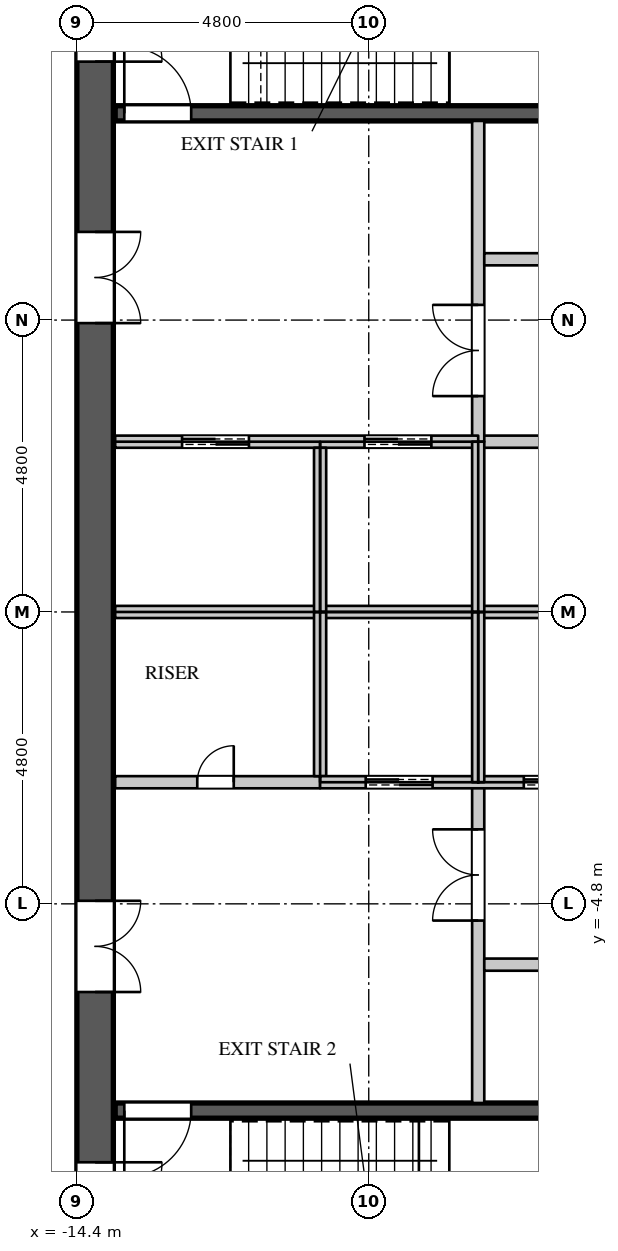
"""IFC4 building model, lengths in metres.
Left out: names, types, materials, properties, quantities, classifications, styles, units other than length and angle.
Written with IfcOpenShell. Run it as: python <this file> out.ifc"""

import sys

from ifc_helpers import new_model, si_unit, direction, frame, frame_2d, origin, place, context, subcontext, project, spatial, rectangle, extrude, element, fill, save


model = new_model("IFC4")
c1 = context("Model", 3, precision=1e-05, world=origin(), true_north=direction((0.0, 1.0)))
c2 = subcontext(c1, "Body", "Model", "MODEL_VIEW")
j1 = project(units=[si_unit("LENGTHUNIT", "METRE"), si_unit("PLANEANGLEUNIT", "RADIAN")], contexts=[c1])
p1 = place(None, origin())
s1 = spatial("IfcSite", under=j1, at=p1, CompositionType="ELEMENT")
p2 = place(p1, origin())
s2 = spatial("IfcBuilding", under=s1, at=p2, CompositionType="ELEMENT")
p3 = place(p2, frame((0.0, 0.0, 226.5)))
s3 = spatial("IfcBuildingStorey", under=s2, at=p3, CompositionType="ELEMENT", Elevation=226.5)
p4 = place(p3, frame((-14.1, -11.4, 0.0), z_axis=(0.0, 0.0, 1.0), x_axis=(0.0, 1.0, 0.0)))
e1 = element("IfcWall", 1, at=p4, inside=s3, PredefinedType="SHEAR", context=c2, shape_type="SweptSolid", body=[
    extrude(rectangle(XDim=22.8, YDim=0.6, at=frame_2d((11.4, 0.0))), origin(), (0.0, 0.0, 1.0), 4.2),
])
p5 = place(p4, frame((20.45, 0.0, 0.0)))
e2 = element("IfcOpeningElement", 2, at=p5, cuts=e1, PredefinedType="OPENING", context=c2, shape_type="SweptSolid", body=[
    extrude(rectangle(XDim=1.1, YDim=2.2, at=frame_2d((0.55, 1.1))), frame((0.0, 0.31, 0.0), z_axis=(0.0, -1.0, 0.0), x_axis=(1.0, 0.0, 0.0)), (0.0, 0.0, 1.0), 0.62),
])
p6 = place(p4, frame((1.25, 0.0, 0.0)))
e3 = element("IfcOpeningElement", 3, at=p6, cuts=e1, PredefinedType="OPENING", context=c2, shape_type="SweptSolid", body=[
    extrude(rectangle(XDim=1.1, YDim=2.2, at=frame_2d((0.55, 1.1))), frame((0.0, 0.31, 0.0), z_axis=(0.0, -1.0, 0.0), x_axis=(1.0, 0.0, 0.0)), (0.0, 0.0, 1.0), 0.62),
])
p7 = place(p4, frame((16.15, 0.0, 0.0)))
e4 = element("IfcOpeningElement", 4, at=p7, cuts=e1, PredefinedType="OPENING", context=c2, shape_type="SweptSolid", body=[
    extrude(rectangle(XDim=1.5, YDim=2.4, at=frame_2d((0.75, 1.2))), frame((0.0, 0.31, 0.0), z_axis=(0.0, -1.0, 0.0), x_axis=(1.0, 0.0, 0.0)), (0.0, 0.0, 1.0), 0.62),
])
p8 = place(p4, frame((5.15, 0.0, 0.0)))
e5 = element("IfcOpeningElement", 5, at=p8, cuts=e1, PredefinedType="OPENING", context=c2, shape_type="SweptSolid", body=[
    extrude(rectangle(XDim=1.5, YDim=2.4, at=frame_2d((0.75, 1.2))), frame((0.0, 0.31, 0.0), z_axis=(0.0, -1.0, 0.0), x_axis=(1.0, 0.0, 0.0)), (0.0, 0.0, 1.0), 0.62),
])
p9 = place(p3, frame((-7.8, 2.8, 0.0), z_axis=(0.0, 0.0, 1.0), x_axis=(1.0, 0.0, 0.0)))
e6 = element("IfcWall", 6, at=p9, inside=s3, PredefinedType="PARTITIONING", context=c2, shape_type="SweptSolid", body=[
    extrude(rectangle(XDim=4.82, YDim=0.2, at=frame_2d((2.41, 0.0))), origin(), (0.0, 0.0, 1.0), 3.95),
])
p10 = place(p9, frame((1.95, 0.0, 0.0)))
e7 = element("IfcOpeningElement", 7, at=p10, cuts=e6, PredefinedType="OPENING", context=c2, shape_type="SweptSolid", body=[
    extrude(rectangle(XDim=0.9, YDim=2.2, at=frame_2d((0.45, 1.1))), frame((0.0, 0.11, 0.0), z_axis=(0.0, -1.0, 0.0), x_axis=(1.0, 0.0, 0.0)), (0.0, 0.0, 1.0), 0.22),
])
p11 = place(p3, frame((-7.8, -8.075, 0.0), z_axis=(0.0, 0.0, 1.0), x_axis=(0.0, 1.0, 0.0)))
e8 = element("IfcWall", 8, at=p11, inside=s3, PredefinedType="PARTITIONING", context=c2, shape_type="SweptSolid", body=[
    extrude(rectangle(XDim=5.275, YDim=0.2, at=frame_2d((2.637, 0.0))), origin(), (0.0, 0.0, 1.0), 3.95),
])
p12 = place(p11, frame((3.0, 0.0, 0.0)))
e9 = element("IfcOpeningElement", 9, at=p12, cuts=e8, PredefinedType="OPENING", context=c2, shape_type="SweptSolid", body=[
    extrude(rectangle(XDim=1.5, YDim=2.4, at=frame_2d((0.75, 1.2))), frame((0.0, 0.11, 0.0), z_axis=(0.0, -1.0, 0.0), x_axis=(1.0, 0.0, 0.0)), (0.0, 0.0, 1.0), 0.22),
])
p13 = place(p3, frame((-7.7, -5.8, 0.0), z_axis=(0.0, 0.0, 1.0), x_axis=(1.0, 0.0, 0.0)))
e10 = element("IfcWall", 10, at=p13, inside=s3, PredefinedType="PARTITIONING", context=c2, shape_type="SweptSolid", body=[
    extrude(rectangle(XDim=21.47, YDim=0.2, at=frame_2d((10.735, 0.0))), origin(), (0.0, 0.0, 1.0), 3.95),
])
p14 = place(p13, frame((6.15, 0.0, 0.0)))
e11 = element("IfcOpeningElement", 11, at=p14, cuts=e10, PredefinedType="OPENING", context=c2, shape_type="SweptSolid", body=[
    extrude(rectangle(XDim=0.9, YDim=2.2, at=frame_2d((0.45, 1.1))), frame((0.0, 0.11, 0.0), z_axis=(0.0, -1.0, 0.0), x_axis=(1.0, 0.0, 0.0)), (0.0, 0.0, 1.0), 0.22),
])
p15 = place(p13, frame((16.75, 0.0, 0.0)))
e12 = element("IfcOpeningElement", 12, at=p15, cuts=e10, PredefinedType="OPENING", context=c2, shape_type="SweptSolid", body=[
    extrude(rectangle(XDim=0.9, YDim=2.2, at=frame_2d((0.45, 1.1))), frame((0.0, 0.11, 0.0), z_axis=(0.0, -1.0, 0.0), x_axis=(1.0, 0.0, 0.0)), (0.0, 0.0, 1.0), 0.22),
])
p16 = place(p3, frame((-7.8, 2.8, 0.0), z_axis=(0.0, 0.0, 1.0), x_axis=(0.0, 1.0, 0.0)))
e13 = element("IfcWall", 13, at=p16, inside=s3, PredefinedType="PARTITIONING", context=c2, shape_type="SweptSolid", body=[
    extrude(rectangle(XDim=5.275, YDim=0.2, at=frame_2d((2.637, 0.0))), origin(), (0.0, 0.0, 1.0), 3.95),
])
p17 = place(p16, frame((0.75, 0.0, 0.0)))
e14 = element("IfcOpeningElement", 14, at=p17, cuts=e13, PredefinedType="OPENING", context=c2, shape_type="SweptSolid", body=[
    extrude(rectangle(XDim=1.5, YDim=2.4, at=frame_2d((0.75, 1.2))), frame((0.0, 0.11, 0.0), z_axis=(0.0, -1.0, 0.0), x_axis=(1.0, 0.0, 0.0)), (0.0, 0.0, 1.0), 0.22),
])
p18 = place(p3, frame((-7.7, 5.8, 0.0), z_axis=(0.0, 0.0, 1.0), x_axis=(1.0, 0.0, 0.0)))
e15 = element("IfcWall", 15, at=p18, inside=s3, PredefinedType="PARTITIONING", context=c2, shape_type="SweptSolid", body=[
    extrude(rectangle(XDim=21.47, YDim=0.2, at=frame_2d((10.735, 0.0))), origin(), (0.0, 0.0, 1.0), 3.95),
])
p19 = place(p18, frame((3.45, 0.0, 0.0)))
e16 = element("IfcOpeningElement", 16, at=p19, cuts=e15, PredefinedType="OPENING", context=c2, shape_type="SweptSolid", body=[
    extrude(rectangle(XDim=0.9, YDim=2.2, at=frame_2d((0.45, 1.1))), frame((0.0, 0.11, 0.0), z_axis=(0.0, -1.0, 0.0), x_axis=(1.0, 0.0, 0.0)), (0.0, 0.0, 1.0), 0.22),
])
p20 = place(p18, frame((9.9, 0.0, 0.0)))
e17 = element("IfcOpeningElement", 17, at=p20, cuts=e15, PredefinedType="OPENING", context=c2, shape_type="SweptSolid", body=[
    extrude(rectangle(XDim=0.9, YDim=2.2, at=frame_2d((0.45, 1.1))), frame((0.0, 0.11, 0.0), z_axis=(0.0, -1.0, 0.0), x_axis=(1.0, 0.0, 0.0)), (0.0, 0.0, 1.0), 0.22),
])
p21 = place(p18, frame((16.75, 0.0, 0.0)))
e18 = element("IfcOpeningElement", 18, at=p21, cuts=e15, PredefinedType="OPENING", context=c2, shape_type="SweptSolid", body=[
    extrude(rectangle(XDim=0.9, YDim=2.2, at=frame_2d((0.45, 1.1))), frame((0.0, 0.11, 0.0), z_axis=(0.0, -1.0, 0.0), x_axis=(1.0, 0.0, 0.0)), (0.0, 0.0, 1.0), 0.22),
])
p22 = place(p3, frame((-13.77, -2.8, 0.0), z_axis=(0.0, 0.0, 1.0), x_axis=(1.0, 0.0, 0.0)))
e19 = element("IfcWall", 19, at=p22, inside=s3, PredefinedType="PARTITIONING", context=c2, shape_type="SweptSolid", body=[
    extrude(rectangle(XDim=3.37, YDim=0.2, at=frame_2d((1.685, 0.0))), origin(), (0.0, 0.0, 1.0), 3.95),
])
p23 = place(p22, frame((1.35, 0.0, 0.0)))
e20 = element("IfcOpeningElement", 20, at=p23, cuts=e19, PredefinedType="OPENING", context=c2, shape_type="SweptSolid", body=[
    extrude(rectangle(XDim=0.6, YDim=2.0, at=frame_2d((0.3, 1.0))), frame((0.0, 0.11, 0.0), z_axis=(0.0, -1.0, 0.0), x_axis=(1.0, 0.0, 0.0)), (0.0, 0.0, 1.0), 0.22),
])
p24 = place(p3, frame((-13.77, 0.0, 0.0), z_axis=(0.0, 0.0, 1.0), x_axis=(1.0, 0.0, 0.0)))
e21 = element("IfcWall", 21, at=p24, inside=s3, PredefinedType="PARTITIONING", context=c2, shape_type="SweptSolid", body=[
    extrude(rectangle(XDim=21.57, YDim=0.2, at=frame_2d((10.785, 0.0))), origin(), (0.0, 0.0, 1.0), 3.95),
])
p25 = place(p3, frame((-13.77, 2.8, 0.0), z_axis=(0.0, 0.0, 1.0), x_axis=(1.0, 0.0, 0.0)))
e22 = element("IfcWall", 22, at=p25, inside=s3, PredefinedType="PARTITIONING", context=c2, shape_type="SweptSolid", body=[
    extrude(rectangle(XDim=5.97, YDim=0.2, at=frame_2d((2.985, 0.0))), origin(), (0.0, 0.0, 1.0), 3.95),
])
p26 = place(p25, frame((1.1, 0.0, 0.0)))
e23 = element("IfcOpeningElement", 23, at=p26, cuts=e22, PredefinedType="OPENING", context=c2, shape_type="SweptSolid", body=[
    extrude(rectangle(XDim=1.1, YDim=2.2, at=frame_2d((0.55, 1.1))), frame((0.0, 0.11, 0.0), z_axis=(0.0, -1.0, 0.0), x_axis=(1.0, 0.0, 0.0)), (0.0, 0.0, 1.0), 0.22),
])
p27 = place(p25, frame((4.1, 0.0, 0.0)))
e24 = element("IfcOpeningElement", 24, at=p27, cuts=e22, PredefinedType="OPENING", context=c2, shape_type="SweptSolid", body=[
    extrude(rectangle(XDim=1.1, YDim=2.2, at=frame_2d((0.55, 1.1))), frame((0.0, 0.11, 0.0), z_axis=(0.0, -1.0, 0.0), x_axis=(1.0, 0.0, 0.0)), (0.0, 0.0, 1.0), 0.22),
])
p28 = place(p3, frame((-10.4, -2.7, 0.0), z_axis=(0.0, 0.0, 1.0), x_axis=(0.0, 1.0, 0.0)))
e25 = element("IfcWall", 25, at=p28, inside=s3, PredefinedType="PARTITIONING", context=c2, shape_type="SweptSolid", body=[
    extrude(rectangle(XDim=2.7, YDim=0.2, at=frame_2d((1.35, 0.0))), origin(), (0.0, 0.0, 1.0), 3.95),
])
p29 = place(p3, frame((-10.4, -2.8, 0.0), z_axis=(0.0, 0.0, 1.0), x_axis=(1.0, 0.0, 0.0)))
e26 = element("IfcWall", 26, at=p29, inside=s3, PredefinedType="PARTITIONING", context=c2, shape_type="SweptSolid", body=[
    extrude(rectangle(XDim=18.2, YDim=0.2, at=frame_2d((9.1, 0.0))), origin(), (0.0, 0.0, 1.0), 3.95),
])
p30 = place(p29, frame((0.75, 0.0, 0.0)))
e27 = element("IfcOpeningElement", 27, at=p30, cuts=e26, PredefinedType="OPENING", context=c2, shape_type="SweptSolid", body=[
    extrude(rectangle(XDim=1.1, YDim=2.2, at=frame_2d((0.55, 1.1))), frame((0.0, 0.11, 0.0), z_axis=(0.0, -1.0, 0.0), x_axis=(1.0, 0.0, 0.0)), (0.0, 0.0, 1.0), 0.22),
])
p31 = place(p29, frame((3.35, 0.0, 0.0)))
e28 = element("IfcOpeningElement", 28, at=p31, cuts=e26, PredefinedType="OPENING", context=c2, shape_type="SweptSolid", body=[
    extrude(rectangle(XDim=1.1, YDim=2.2, at=frame_2d((0.55, 1.1))), frame((0.0, 0.11, 0.0), z_axis=(0.0, -1.0, 0.0), x_axis=(1.0, 0.0, 0.0)), (0.0, 0.0, 1.0), 0.22),
])
p32 = place(p29, frame((5.95, 0.0, 0.0)))
e29 = element("IfcOpeningElement", 29, at=p32, cuts=e26, PredefinedType="OPENING", context=c2, shape_type="SweptSolid", body=[
    extrude(rectangle(XDim=1.1, YDim=2.2, at=frame_2d((0.55, 1.1))), frame((0.0, 0.11, 0.0), z_axis=(0.0, -1.0, 0.0), x_axis=(1.0, 0.0, 0.0)), (0.0, 0.0, 1.0), 0.22),
])
p33 = place(p29, frame((8.55, 0.0, 0.0)))
e30 = element("IfcOpeningElement", 30, at=p33, cuts=e26, PredefinedType="OPENING", context=c2, shape_type="SweptSolid", body=[
    extrude(rectangle(XDim=1.1, YDim=2.2, at=frame_2d((0.55, 1.1))), frame((0.0, 0.11, 0.0), z_axis=(0.0, -1.0, 0.0), x_axis=(1.0, 0.0, 0.0)), (0.0, 0.0, 1.0), 0.22),
])
p34 = place(p29, frame((11.15, 0.0, 0.0)))
e31 = element("IfcOpeningElement", 31, at=p34, cuts=e26, PredefinedType="OPENING", context=c2, shape_type="SweptSolid", body=[
    extrude(rectangle(XDim=1.1, YDim=2.2, at=frame_2d((0.55, 1.1))), frame((0.0, 0.11, 0.0), z_axis=(0.0, -1.0, 0.0), x_axis=(1.0, 0.0, 0.0)), (0.0, 0.0, 1.0), 0.22),
])
p35 = place(p29, frame((13.75, 0.0, 0.0)))
e32 = element("IfcOpeningElement", 32, at=p35, cuts=e26, PredefinedType="OPENING", context=c2, shape_type="SweptSolid", body=[
    extrude(rectangle(XDim=1.1, YDim=2.2, at=frame_2d((0.55, 1.1))), frame((0.0, 0.11, 0.0), z_axis=(0.0, -1.0, 0.0), x_axis=(1.0, 0.0, 0.0)), (0.0, 0.0, 1.0), 0.22),
])
p36 = place(p29, frame((16.35, 0.0, 0.0)))
e33 = element("IfcOpeningElement", 33, at=p36, cuts=e26, PredefinedType="OPENING", context=c2, shape_type="SweptSolid", body=[
    extrude(rectangle(XDim=1.1, YDim=2.2, at=frame_2d((0.55, 1.1))), frame((0.0, 0.11, 0.0), z_axis=(0.0, -1.0, 0.0), x_axis=(1.0, 0.0, 0.0)), (0.0, 0.0, 1.0), 0.22),
])
p37 = place(p3, frame((-10.4, 0.0, 0.0), z_axis=(0.0, 0.0, 1.0), x_axis=(0.0, 1.0, 0.0)))
e34 = element("IfcWall", 34, at=p37, inside=s3, PredefinedType="PARTITIONING", context=c2, shape_type="SweptSolid", body=[
    extrude(rectangle(XDim=2.7, YDim=0.2, at=frame_2d((1.35, 0.0))), origin(), (0.0, 0.0, 1.0), 3.95),
])
for number, where, z_axis, x_axis in (
    (35, (-7.8, -2.8, 0.0), (0.0, 0.0, 1.0), (0.0, 1.0, 0.0)),
    (36, (-7.8, 0.0, 0.0), (0.0, 0.0, 1.0), (0.0, 1.0, 0.0)),
):
    element("IfcWall", number, at=place(p3, frame(where, z_axis=z_axis, x_axis=x_axis)), inside=s3, PredefinedType="PARTITIONING", context=c2, shape_type="SweptSolid", body=[
        extrude(rectangle(XDim=2.8, YDim=0.2, at=frame_2d((1.4, 0.0))), origin(), (0.0, 0.0, 1.0), 3.95),
    ])
p38 = place(p3, frame((-13.77, -8.2, 0.0), z_axis=(0.0, 0.0, 1.0), x_axis=(1.0, 0.0, 0.0)))
e37 = element("IfcWall", 37, at=p38, inside=s3, PredefinedType="SHEAR", context=c2, shape_type="SweptSolid", body=[
    extrude(rectangle(XDim=8.495, YDim=0.25, at=frame_2d((4.248, 0.0))), origin(), (0.0, 0.0, 1.0), 3.95),
])
p39 = place(p38, frame((0.15, 0.0, 0.0)))
e38 = element("IfcOpeningElement", 38, at=p39, cuts=e37, PredefinedType="OPENING", context=c2, shape_type="SweptSolid", body=[
    extrude(rectangle(XDim=1.1, YDim=2.2, at=frame_2d((0.55, 1.1))), frame((0.0, 0.135, 0.0), z_axis=(0.0, -1.0, 0.0), x_axis=(1.0, 0.0, 0.0)), (0.0, 0.0, 1.0), 0.27),
])
p40 = place(p3, frame((-13.77, 8.2, 0.0), z_axis=(0.0, 0.0, 1.0), x_axis=(1.0, 0.0, 0.0)))
e39 = element("IfcWall", 39, at=p40, inside=s3, PredefinedType="SHEAR", context=c2, shape_type="SweptSolid", body=[
    extrude(rectangle(XDim=8.495, YDim=0.25, at=frame_2d((4.248, 0.0))), origin(), (0.0, 0.0, 1.0), 3.95),
])
p41 = place(p40, frame((0.15, 0.0, 0.0)))
e40 = element("IfcOpeningElement", 40, at=p41, cuts=e39, PredefinedType="OPENING", context=c2, shape_type="SweptSolid", body=[
    extrude(rectangle(XDim=1.1, YDim=2.2, at=frame_2d((0.55, 1.1))), frame((0.0, 0.135, 0.0), z_axis=(0.0, -1.0, 0.0), x_axis=(1.0, 0.0, 0.0)), (0.0, 0.0, 1.0), 0.27),
])
p42 = place(p23, origin())
e41 = element("IfcDoor", 41, at=p42, inside=s3, OperationType="SINGLE_SWING_RIGHT", PredefinedType="DOOR", context=c2, shape_type="SweptSolid", body=[
    extrude(rectangle(XDim=0.6, YDim=2.0, at=frame_2d((0.3, 1.0))), frame((0.0, 0.025, 0.0), z_axis=(0.0, -1.0, 0.0), x_axis=(1.0, 0.0, 0.0)), (0.0, 0.0, 1.0), 0.05),
])
fill(e20, e41)
p43 = place(p26, origin())
e42 = element("IfcDoor", 42, at=p43, inside=s3, OperationType="DOUBLE_DOOR_SLIDING", PredefinedType="DOOR", context=c2, shape_type="SweptSolid", body=[
    extrude(rectangle(XDim=1.1, YDim=2.2, at=frame_2d((0.55, 1.1))), frame((0.0, 0.025, 0.0), z_axis=(0.0, -1.0, 0.0), x_axis=(1.0, 0.0, 0.0)), (0.0, 0.0, 1.0), 0.05),
])
fill(e23, e42)
p44 = place(p27, origin())
e43 = element("IfcDoor", 43, at=p44, inside=s3, OperationType="DOUBLE_DOOR_SLIDING", PredefinedType="DOOR", context=c2, shape_type="SweptSolid", body=[
    extrude(rectangle(XDim=1.1, YDim=2.2, at=frame_2d((0.55, 1.1))), frame((0.0, 0.025, 0.0), z_axis=(0.0, -1.0, 0.0), x_axis=(1.0, 0.0, 0.0)), (0.0, 0.0, 1.0), 0.05),
])
fill(e24, e43)
p45 = place(p30, origin())
e44 = element("IfcDoor", 44, at=p45, inside=s3, OperationType="DOUBLE_DOOR_SLIDING", PredefinedType="DOOR", context=c2, shape_type="SweptSolid", body=[
    extrude(rectangle(XDim=1.1, YDim=2.2, at=frame_2d((0.55, 1.1))), frame((0.0, 0.025, 0.0), z_axis=(0.0, -1.0, 0.0), x_axis=(1.0, 0.0, 0.0)), (0.0, 0.0, 1.0), 0.05),
])
fill(e27, e44)
p46 = place(p31, origin())
e45 = element("IfcDoor", 45, at=p46, inside=s3, OperationType="DOUBLE_DOOR_SLIDING", PredefinedType="DOOR", context=c2, shape_type="SweptSolid", body=[
    extrude(rectangle(XDim=1.1, YDim=2.2, at=frame_2d((0.55, 1.1))), frame((0.0, 0.025, 0.0), z_axis=(0.0, -1.0, 0.0), x_axis=(1.0, 0.0, 0.0)), (0.0, 0.0, 1.0), 0.05),
])
fill(e28, e45)
p47 = place(p41, origin())
e46 = element("IfcDoor", 46, at=p47, inside=s3, OperationType="SINGLE_SWING_LEFT", PredefinedType="DOOR", context=c2, shape_type="SweptSolid", body=[
    extrude(rectangle(XDim=1.1, YDim=2.2, at=frame_2d((0.55, 1.1))), frame((0.0, 0.025, 0.0), z_axis=(0.0, -1.0, 0.0), x_axis=(1.0, 0.0, 0.0)), (0.0, 0.0, 1.0), 0.05),
])
fill(e40, e46)
p48 = place(p39, origin())
e47 = element("IfcDoor", 47, at=p48, inside=s3, OperationType="SINGLE_SWING_RIGHT", PredefinedType="DOOR", context=c2, shape_type="SweptSolid", body=[
    extrude(rectangle(XDim=1.1, YDim=2.2, at=frame_2d((0.55, 1.1))), frame((0.0, 0.025, 0.0), z_axis=(0.0, -1.0, 0.0), x_axis=(1.0, 0.0, 0.0)), (0.0, 0.0, 1.0), 0.05),
])
fill(e38, e47)
p49 = place(p17, origin())
e48 = element("IfcDoor", 48, at=p49, inside=s3, OperationType="DOUBLE_DOOR_SINGLE_SWING", PredefinedType="DOOR", context=c2, shape_type="SweptSolid", body=[
    extrude(rectangle(XDim=1.5, YDim=2.4, at=frame_2d((0.75, 1.2))), frame((0.0, 0.025, 0.0), z_axis=(0.0, -1.0, 0.0), x_axis=(1.0, 0.0, 0.0)), (0.0, 0.0, 1.0), 0.05),
])
fill(e14, e48)
p50 = place(p12, origin())
e49 = element("IfcDoor", 49, at=p50, inside=s3, OperationType="DOUBLE_DOOR_SINGLE_SWING", PredefinedType="DOOR", context=c2, shape_type="SweptSolid", body=[
    extrude(rectangle(XDim=1.5, YDim=2.4, at=frame_2d((0.75, 1.2))), frame((0.0, 0.025, 0.0), z_axis=(0.0, -1.0, 0.0), x_axis=(1.0, 0.0, 0.0)), (0.0, 0.0, 1.0), 0.05),
])
fill(e9, e49)
p51 = place(p5, origin())
e50 = element("IfcDoor", 50, at=p51, inside=s3, OperationType="SINGLE_SWING_RIGHT", PredefinedType="DOOR", context=c2, shape_type="SweptSolid", body=[
    extrude(rectangle(XDim=1.1, YDim=2.2, at=frame_2d((0.55, 1.1))), frame((0.0, -0.245, 0.0), z_axis=(0.0, -1.0, 0.0), x_axis=(1.0, 0.0, 0.0)), (0.0, 0.0, 1.0), 0.05),
])
fill(e2, e50)
p52 = place(p6, origin())
e51 = element("IfcDoor", 51, at=p52, inside=s3, OperationType="SINGLE_SWING_LEFT", PredefinedType="DOOR", context=c2, shape_type="SweptSolid", body=[
    extrude(rectangle(XDim=1.1, YDim=2.2, at=frame_2d((0.55, 1.1))), frame((0.0, -0.245, 0.0), z_axis=(0.0, -1.0, 0.0), x_axis=(1.0, 0.0, 0.0)), (0.0, 0.0, 1.0), 0.05),
])
fill(e3, e51)
p53 = place(p7, origin())
e52 = element("IfcDoor", 52, at=p53, inside=s3, OperationType="DOUBLE_DOOR_SINGLE_SWING", PredefinedType="DOOR", context=c2, shape_type="SweptSolid", body=[
    extrude(rectangle(XDim=1.5, YDim=2.4, at=frame_2d((0.75, 1.2))), frame((0.0, -0.245, 0.0), z_axis=(0.0, -1.0, 0.0), x_axis=(1.0, 0.0, 0.0)), (0.0, 0.0, 1.0), 0.05),
])
fill(e4, e52)
p54 = place(p8, origin())
e53 = element("IfcDoor", 53, at=p54, inside=s3, OperationType="DOUBLE_DOOR_SINGLE_SWING", PredefinedType="DOOR", context=c2, shape_type="SweptSolid", body=[
    extrude(rectangle(XDim=1.5, YDim=2.4, at=frame_2d((0.75, 1.2))), frame((0.0, -0.245, 0.0), z_axis=(0.0, -1.0, 0.0), x_axis=(1.0, 0.0, 0.0)), (0.0, 0.0, 1.0), 0.05),
])
fill(e5, e53)
save(model, sys.argv[1])
